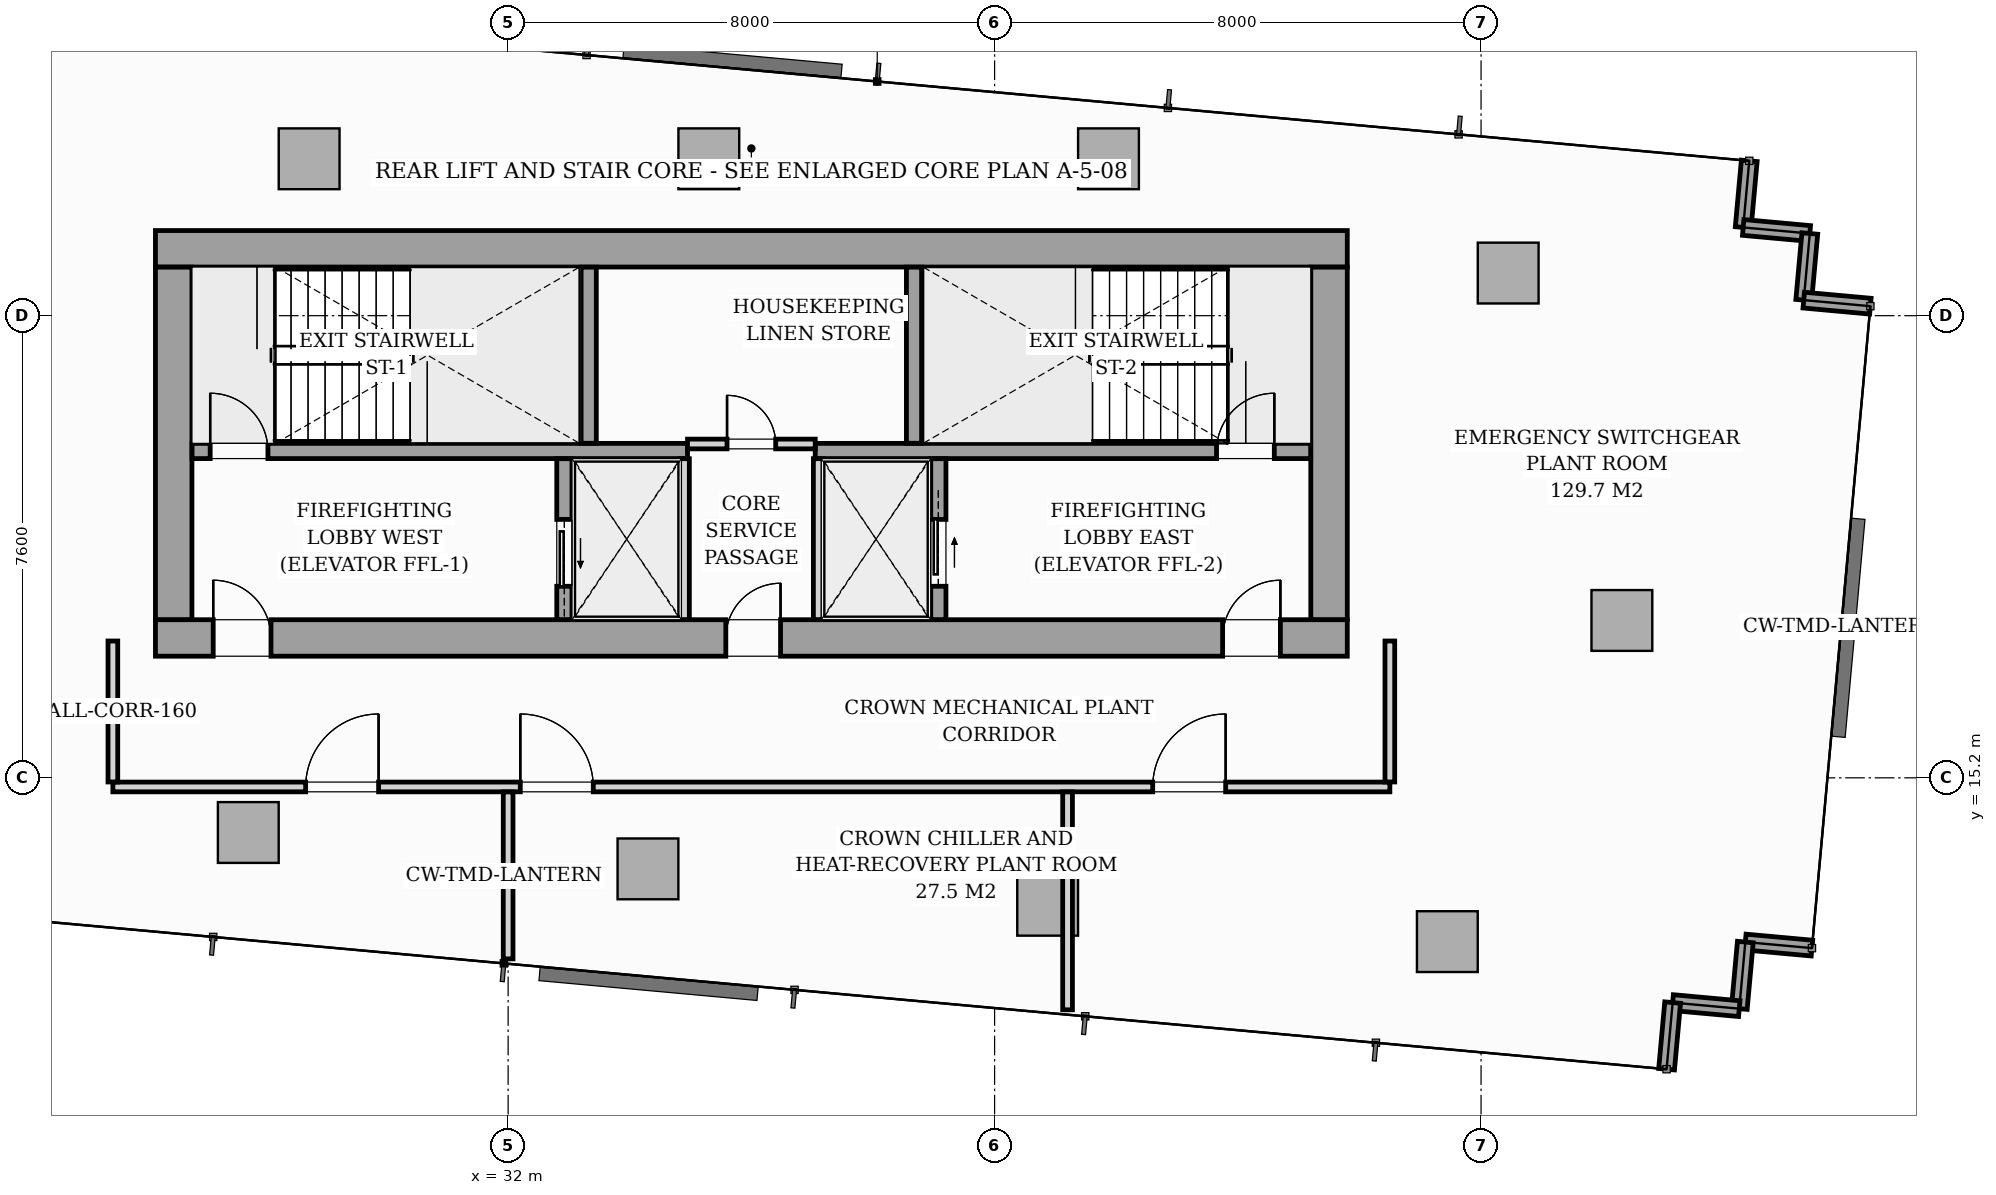
"""IFC4 building model, lengths in metres.
Left out: names, types, materials, properties, quantities, classifications, styles, units other than length and angle.
Written with IfcOpenShell. Run it as: python <this file> out.ifc"""

import sys

from ifc_helpers import new_model, si_unit, direction, frame, frame_2d, origin, origin_2d, place, context, subcontext, project, spatial, rectangle, i_section, extrude, source, transform, mapped, element, fill, save


model = new_model("IFC4")
c1 = context("Model", 3, precision=1e-05, world=origin(), true_north=direction((0.0, 1.0)))
c2 = subcontext(c1, "Body", "Model", "MODEL_VIEW")
j1 = project(units=[si_unit("LENGTHUNIT", "METRE"), si_unit("PLANEANGLEUNIT", "RADIAN")], contexts=[c1])
p1 = place(None, origin())
s1 = spatial("IfcSite", under=j1, at=p1, CompositionType="ELEMENT")
p2 = place(p1, origin())
s2 = spatial("IfcBuilding", under=s1, at=p2, CompositionType="ELEMENT")
p3 = place(p2, frame((0.0, 0.0, 277.3)))
s3 = spatial("IfcBuildingStorey", under=s2, at=p3, CompositionType="ELEMENT", Elevation=277.3)
m1 = source(origin(), c2, "Body", "SweptSolid", [
    extrude(i_section(OverallWidth=0.404, OverallDepth=0.407, WebThickness=0.027, FlangeThickness=0.044, FilletRadius=0.018, at=origin_2d()), origin(), (0.0, 0.0, 1.0), 6.496),
])
for number, where, z_axis, x_axis in (
    (1, (26.4, 17.4, 0.002), (0.0, 0.0, 1.0), (1.0, 0.0, 0.0)),
    (2, (33.12, 17.4, 0.002), (0.0, 0.0, 1.0), (1.0, 0.0, 0.0)),
    (3, (38.88, 17.4, 0.002), (0.0, 0.0, 1.0), (1.0, 0.0, 0.0)),
    (4, (45.6, 17.4, 0.002), (0.0, 0.0, 1.0), (1.0, 0.0, 0.0)),
    (5, (26.4, 24.0, 0.002), (0.0, 0.0, 1.0), (1.0, 0.0, 0.0)),
    (6, (33.12, 24.0, 0.002), (0.0, 0.0, 1.0), (1.0, 0.0, 0.0)),
    (7, (38.88, 24.0, 0.002), (0.0, 0.0, 1.0), (1.0, 0.0, 0.0)),
    (8, (45.6, 24.0, 0.002), (0.0, 0.0, 1.0), (1.0, 0.0, 0.0)),
):
    element("IfcColumn", number, at=place(p3, frame(where, z_axis=z_axis, x_axis=x_axis)), inside=s3, PredefinedType="PILASTER", context=c2, shape_type="MappedRepresentation", body=[
        mapped(m1, transform((0.0, 0.0, 0.0), scale=1.0)),
    ])
m2 = source(origin(), c2, "Body", "SweptSolid", [
    extrude(rectangle(XDim=1.0, YDim=1.0, at=origin_2d()), origin(), (0.0, 0.0, 1.0), 6.496),
])
for number, where, z_axis, x_axis in (
    (9, (27.727, 14.301, 0.002), (0.0, 0.0, 1.0), (0.996, -0.091, 0.0)),
    (10, (34.3, 13.703, 0.002), (0.0, 0.0, 1.0), (0.996, -0.091, 0.0)),
    (11, (40.873, 13.104, 0.002), (0.0, 0.0, 1.0), (0.996, -0.091, 0.0)),
    (12, (47.445, 12.506, 0.002), (0.0, 0.0, 1.0), (0.996, -0.091, 0.0)),
    (13, (28.728, 25.38, 0.002), (0.0, 0.0, 1.0), (0.996, -0.091, 0.0)),
    (14, (35.3, 25.38, 0.002), (0.0, 0.0, 1.0), (0.996, -0.091, 0.0)),
    (15, (41.873, 25.38, 0.002), (0.0, 0.0, 1.0), (0.996, -0.091, 0.0)),
    (16, (48.446, 23.501, 0.002), (0.0, 0.0, 1.0), (0.996, -0.091, 0.0)),
    (17, (50.316, 17.788, 0.002), (0.0, 0.0, 1.0), (0.996, -0.091, 0.0)),
):
    element("IfcColumn", number, at=place(p3, frame(where, z_axis=z_axis, x_axis=x_axis)), inside=s3, PredefinedType="COLUMN", context=c2, shape_type="MappedRepresentation", body=[
        mapped(m2, transform((0.0, 0.0, 0.0), scale=1.0)),
    ])
p4 = place(p3, frame((52.411, 25.346, 0.0), z_axis=(0.0, 0.0, 1.0), x_axis=(-0.09077588162, -0.995871346769, 0.0)))
e18 = element("IfcWall", 18, at=p4, inside=s3, PredefinedType="STANDARD", context=c2, shape_type="SweptSolid", body=[
    extrude(rectangle(XDim=1.1, YDim=0.26, at=frame_2d((0.55, 0.0))), origin(), (0.0, 0.0, 1.0), 6.22),
])
p5 = place(p3, frame((52.311, 24.251, 0.0), z_axis=(0.0, 0.0, 1.0), x_axis=(0.995893206468, -0.090535746043, 0.0)))
e19 = element("IfcWall", 19, at=p5, inside=s3, PredefinedType="STANDARD", context=c2, shape_type="SweptSolid", body=[
    extrude(rectangle(XDim=1.1, YDim=0.26, at=frame_2d((0.55, 0.0))), origin(), (0.0, 0.0, 1.0), 6.22),
])
for number, where, z_axis, x_axis in (
    (20, (53.406, 24.151, 0.0), (0.0, 0.0, 1.0), (-0.091, -0.996, 0.0)),
    (21, (53.307, 23.056, 0.0), (0.0, 0.0, 1.0), (0.996, -0.091, 0.0)),
    (22, (53.441, 12.4, 0.0), (0.0, 0.0, 1.0), (-0.996, 0.091, 0.0)),
    (23, (52.346, 12.5, 0.0), (0.0, 0.0, 1.0), (-0.091, -0.996, 0.0)),
    (24, (52.246, 11.404, 0.0), (0.0, 0.0, 1.0), (-0.996, 0.091, 0.0)),
    (25, (51.151, 11.504, 0.0), (0.0, 0.0, 1.0), (-0.091, -0.996, 0.0)),
):
    element("IfcWall", number, at=place(p3, frame(where, z_axis=z_axis, x_axis=x_axis)), inside=s3, PredefinedType="STANDARD", context=c2, shape_type="SweptSolid", body=[
        extrude(rectangle(XDim=1.1, YDim=0.26, at=frame_2d((0.55, 0.0))), origin(), (0.0, 0.0, 1.0), 6.22),
    ])
p6 = place(p3, frame((26.2, 17.5, 0.0), z_axis=(0.0, 0.0, 1.0), x_axis=(1.0, 0.0, 0.0)))
e26 = element("IfcWall", 26, at=p6, inside=s3, PredefinedType="SHEAR", context=c2, shape_type="SweptSolid", body=[
    extrude(rectangle(XDim=19.6, YDim=0.6, at=frame_2d((9.8, 0.0))), origin(), (0.0, 0.0, 1.0), 6.5),
])
p7 = place(p6, frame((0.95, 0.0, 0.0)))
e27 = element("IfcOpeningElement", 27, at=p7, cuts=e26, PredefinedType="OPENING", context=c2, shape_type="SweptSolid", body=[
    extrude(rectangle(XDim=0.95, YDim=2.06, at=frame_2d((0.475, 1.03))), frame((0.0, 0.31, 0.0), z_axis=(0.0, -1.0, 0.0), x_axis=(1.0, 0.0, 0.0)), (0.0, 0.0, 1.0), 0.62),
])
p8 = place(p6, frame((9.38, 0.0, 0.0)))
e28 = element("IfcOpeningElement", 28, at=p8, cuts=e26, PredefinedType="OPENING", context=c2, shape_type="SweptSolid", body=[
    extrude(rectangle(XDim=0.9, YDim=2.06, at=frame_2d((0.45, 1.03))), frame((0.0, 0.31, 0.0), z_axis=(0.0, -1.0, 0.0), x_axis=(1.0, 0.0, 0.0)), (0.0, 0.0, 1.0), 0.62),
])
p9 = place(p6, frame((17.55, 0.0, 0.0)))
e29 = element("IfcOpeningElement", 29, at=p9, cuts=e26, PredefinedType="OPENING", context=c2, shape_type="SweptSolid", body=[
    extrude(rectangle(XDim=0.95, YDim=2.06, at=frame_2d((0.475, 1.03))), frame((0.0, 0.31, 0.0), z_axis=(0.0, -1.0, 0.0), x_axis=(1.0, 0.0, 0.0)), (0.0, 0.0, 1.0), 0.62),
])
p10 = place(p3, frame((26.2, 23.9, 0.0), z_axis=(0.0, 0.0, 1.0), x_axis=(1.0, 0.0, 0.0)))
e30 = element("IfcWall", 30, at=p10, inside=s3, PredefinedType="SHEAR", context=c2, shape_type="SweptSolid", body=[
    extrude(rectangle(XDim=19.6, YDim=0.6, at=frame_2d((9.8, 0.0))), origin(), (0.0, 0.0, 1.0), 6.5),
])
for number, where, z_axis, x_axis in (
    (31, (26.5, 17.802, 0.0), (0.0, 0.0, 1.0), (0.0, 1.0, 0.0)),
    (32, (45.5, 17.802, 0.0), (0.0, 0.0, 1.0), (0.0, 1.0, 0.0)),
):
    element("IfcWall", number, at=place(p3, frame(where, z_axis=z_axis, x_axis=x_axis)), inside=s3, PredefinedType="SHEAR", context=c2, shape_type="SweptSolid", body=[
        extrude(rectangle(XDim=5.796, YDim=0.6, at=frame_2d((2.898, 0.0))), origin(), (0.0, 0.0, 1.0), 6.5),
    ])
p11 = place(p3, frame((26.802, 20.575, 0.0), z_axis=(0.0, 0.0, 1.0), x_axis=(1.0, 0.0, 0.0)))
e33 = element("IfcWall", 33, at=p11, inside=s3, PredefinedType="SOLIDWALL", context=c2, shape_type="SweptSolid", body=[
    extrude(rectangle(XDim=8.148, YDim=0.25, at=frame_2d((4.074, 0.0))), origin(), (0.0, 0.0, 1.0), 6.5),
])
p12 = place(p11, frame((0.298, 0.0, 0.0)))
e34 = element("IfcOpeningElement", 34, at=p12, cuts=e33, PredefinedType="OPENING", context=c2, shape_type="SweptSolid", body=[
    extrude(rectangle(XDim=0.95, YDim=2.06, at=frame_2d((0.475, 1.03))), frame((0.0, 0.135, 0.0), z_axis=(0.0, -1.0, 0.0), x_axis=(1.0, 0.0, 0.0)), (0.0, 0.0, 1.0), 0.27),
])
p13 = place(p3, frame((37.05, 20.575, 0.0), z_axis=(0.0, 0.0, 1.0), x_axis=(1.0, 0.0, 0.0)))
e35 = element("IfcWall", 35, at=p13, inside=s3, PredefinedType="SOLIDWALL", context=c2, shape_type="SweptSolid", body=[
    extrude(rectangle(XDim=8.148, YDim=0.25, at=frame_2d((4.074, 0.0))), origin(), (0.0, 0.0, 1.0), 6.5),
])
p14 = place(p13, frame((6.6, 0.0, 0.0)))
e36 = element("IfcOpeningElement", 36, at=p14, cuts=e35, PredefinedType="OPENING", context=c2, shape_type="SweptSolid", body=[
    extrude(rectangle(XDim=0.95, YDim=2.06, at=frame_2d((0.475, 1.03))), frame((0.0, 0.135, 0.0), z_axis=(0.0, -1.0, 0.0), x_axis=(1.0, 0.0, 0.0)), (0.0, 0.0, 1.0), 0.27),
])
for number, where, z_axis, x_axis in (
    (37, (33.325, 20.702, 0.0), (0.0, 0.0, 1.0), (0.0, 1.0, 0.0)),
    (38, (38.675, 20.702, 0.0), (0.0, 0.0, 1.0), (0.0, 1.0, 0.0)),
):
    element("IfcWall", number, at=place(p3, frame(where, z_axis=z_axis, x_axis=x_axis)), inside=s3, PredefinedType="SOLIDWALL", context=c2, shape_type="SweptSolid", body=[
        extrude(rectangle(XDim=2.896, YDim=0.25, at=frame_2d((1.448, 0.0))), origin(), (0.0, 0.0, 1.0), 6.5),
    ])
p15 = place(p3, frame((32.925, 17.802, 0.0), z_axis=(0.0, 0.0, 1.0), x_axis=(0.0, 1.0, 0.0)))
e39 = element("IfcWall", 39, at=p15, inside=s3, PredefinedType="SOLIDWALL", context=c2, shape_type="SweptSolid", body=[
    extrude(rectangle(XDim=2.646, YDim=0.25, at=frame_2d((1.323, 0.0))), origin(), (0.0, 0.0, 1.0), 6.5),
])
p16 = place(p15, frame((0.548, 0.0, 0.0)))
e40 = element("IfcOpeningElement", 40, at=p16, cuts=e39, PredefinedType="OPENING", context=c2, shape_type="SweptSolid", body=[
    extrude(rectangle(XDim=1.1, YDim=2.08, at=frame_2d((0.55, 1.04))), frame((0.0, 0.135, 0.0), z_axis=(0.0, -1.0, 0.0), x_axis=(1.0, 0.0, 0.0)), (0.0, 0.0, 1.0), 0.27),
])
for number, where, z_axis, x_axis in (
    (41, (34.9, 17.802, 0.0), (0.0, 0.0, 1.0), (0.0, 1.0, 0.0)),
    (42, (37.1, 17.802, 0.0), (0.0, 0.0, 1.0), (0.0, 1.0, 0.0)),
):
    element("IfcWall", number, at=place(p3, frame(where, z_axis=z_axis, x_axis=x_axis)), inside=s3, PredefinedType="PARTITIONING", context=c2, shape_type="SweptSolid", body=[
        extrude(rectangle(XDim=2.646, YDim=0.16, at=frame_2d((1.323, 0.0))), origin(), (0.0, 0.0, 1.0), 6.22),
    ])
p17 = place(p3, frame((39.075, 17.802, 0.0), z_axis=(0.0, 0.0, 1.0), x_axis=(0.0, 1.0, 0.0)))
e43 = element("IfcWall", 43, at=p17, inside=s3, PredefinedType="SOLIDWALL", context=c2, shape_type="SweptSolid", body=[
    extrude(rectangle(XDim=2.646, YDim=0.25, at=frame_2d((1.323, 0.0))), origin(), (0.0, 0.0, 1.0), 6.5),
])
p18 = place(p17, frame((0.548, 0.0, 0.0)))
e44 = element("IfcOpeningElement", 44, at=p18, cuts=e43, PredefinedType="OPENING", context=c2, shape_type="SweptSolid", body=[
    extrude(rectangle(XDim=1.1, YDim=2.08, at=frame_2d((0.55, 1.04))), frame((0.0, 0.135, 0.0), z_axis=(0.0, -1.0, 0.0), x_axis=(1.0, 0.0, 0.0)), (0.0, 0.0, 1.0), 0.27),
])
p19 = place(p3, frame((34.95, 20.69, 0.0), z_axis=(0.0, 0.0, 1.0), x_axis=(1.0, 0.0, 0.0)))
e45 = element("IfcWall", 45, at=p19, inside=s3, PredefinedType="PARTITIONING", context=c2, shape_type="SweptSolid", body=[
    extrude(rectangle(XDim=2.1, YDim=0.16, at=frame_2d((1.05, 0.0))), origin(), (0.0, 0.0, 1.0), 6.22),
])
p20 = place(p19, frame((0.65, 0.0, 0.0)))
e46 = element("IfcOpeningElement", 46, at=p20, cuts=e45, PredefinedType="OPENING", context=c2, shape_type="SweptSolid", body=[
    extrude(rectangle(XDim=0.8, YDim=2.05, at=frame_2d((0.4, 1.025))), frame((0.0, 0.09, 0.0), z_axis=(0.0, -1.0, 0.0), x_axis=(1.0, 0.0, 0.0)), (0.0, 0.0, 1.0), 0.18),
])
p21 = place(p3, frame((25.5, 15.05, 0.0), z_axis=(0.0, 0.0, 1.0), x_axis=(1.0, 0.0, 0.0)))
e47 = element("IfcWall", 47, at=p21, inside=s3, PredefinedType="PARTITIONING", context=c2, shape_type="SweptSolid", body=[
    extrude(rectangle(XDim=21.0, YDim=0.16, at=frame_2d((10.5, 0.0))), origin(), (0.0, 0.0, 1.0), 5.948),
])
p22 = place(p21, frame((3.17, 0.0, 0.0)))
e48 = element("IfcOpeningElement", 48, at=p22, cuts=e47, PredefinedType="OPENING", context=c2, shape_type="SweptSolid", body=[
    extrude(rectangle(XDim=1.2, YDim=2.08, at=frame_2d((0.6, 1.04))), frame((0.0, 0.09, 0.0), z_axis=(0.0, -1.0, 0.0), x_axis=(1.0, 0.0, 0.0)), (0.0, 0.0, 1.0), 0.18),
])
p23 = place(p21, frame((6.7, 0.0, 0.0)))
e49 = element("IfcOpeningElement", 49, at=p23, cuts=e47, PredefinedType="OPENING", context=c2, shape_type="SweptSolid", body=[
    extrude(rectangle(XDim=1.2, YDim=2.08, at=frame_2d((0.6, 1.04))), frame((0.0, 0.09, 0.0), z_axis=(0.0, -1.0, 0.0), x_axis=(1.0, 0.0, 0.0)), (0.0, 0.0, 1.0), 0.18),
])
p24 = place(p21, frame((17.1, 0.0, 0.0)))
e50 = element("IfcOpeningElement", 50, at=p24, cuts=e47, PredefinedType="OPENING", context=c2, shape_type="SweptSolid", body=[
    extrude(rectangle(XDim=1.2, YDim=2.08, at=frame_2d((0.6, 1.04))), frame((0.0, 0.09, 0.0), z_axis=(0.0, -1.0, 0.0), x_axis=(1.0, 0.0, 0.0)), (0.0, 0.0, 1.0), 0.18),
])
for number, where, z_axis, x_axis in (
    (51, (25.5, 15.132, 0.0), (0.0, 0.0, 1.0), (0.0, 1.0, 0.0)),
    (52, (46.5, 15.132, 0.0), (0.0, 0.0, 1.0), (0.0, 1.0, 0.0)),
):
    element("IfcWall", number, at=place(p3, frame(where, z_axis=z_axis, x_axis=x_axis)), inside=s3, PredefinedType="PARTITIONING", context=c2, shape_type="SweptSolid", body=[
        extrude(rectangle(XDim=2.318, YDim=0.16, at=frame_2d((1.159, 0.0))), origin(), (0.0, 0.0, 1.0), 6.22),
    ])
p25 = place(p3, frame((32.0, 12.222, 0.0), z_axis=(0.0, 0.0, 1.0), x_axis=(0.0, 1.0, 0.0)))
e53 = element("IfcWall", 53, at=p25, inside=s3, PredefinedType="PARTITIONING", context=c2, shape_type="SweptSolid", body=[
    extrude(rectangle(XDim=2.746, YDim=0.16, at=frame_2d((1.373, 0.0))), origin(), (0.0, 0.0, 1.0), 6.22),
])
p26 = place(p3, frame((41.2, 11.385, 0.0), z_axis=(0.0, 0.0, 1.0), x_axis=(0.0, 1.0, 0.0)))
e54 = element("IfcWall", 54, at=p26, inside=s3, PredefinedType="PARTITIONING", context=c2, shape_type="SweptSolid", body=[
    extrude(rectangle(XDim=3.583, YDim=0.16, at=frame_2d((1.792, 0.0))), origin(), (0.0, 0.0, 1.0), 6.22),
])
m3 = source(origin(), c2, "Body", "SweptSolid", [
    extrude(rectangle(XDim=0.95, YDim=2.06, at=frame_2d((0.475, 1.03))), frame((0.0, 0.025, 0.0), z_axis=(0.0, -1.0, 0.0), x_axis=(1.0, 0.0, 0.0)), (0.0, 0.0, 1.0), 0.05),
])
p27 = place(p7, origin())
e55 = element("IfcDoor", 55, at=p27, inside=s3, OperationType="SINGLE_SWING_LEFT", PredefinedType="DOOR", context=c2, shape_type="MappedRepresentation", body=[
    mapped(m3, transform((0.0, 0.0, 0.0), scale=1.0)),
])
fill(e27, e55)
m4 = source(origin(), c2, "Body", "SweptSolid", [
    extrude(rectangle(XDim=0.9, YDim=2.06, at=frame_2d((0.45, 1.03))), frame((0.0, 0.025, 0.0), z_axis=(0.0, -1.0, 0.0), x_axis=(1.0, 0.0, 0.0)), (0.0, 0.0, 1.0), 0.05),
])
p28 = place(p8, origin())
e56 = element("IfcDoor", 56, at=p28, inside=s3, OperationType="SINGLE_SWING_RIGHT", PredefinedType="DOOR", context=c2, shape_type="MappedRepresentation", body=[
    mapped(m4, transform((0.0, 0.0, 0.0), scale=1.0)),
])
fill(e28, e56)
p29 = place(p9, origin())
e57 = element("IfcDoor", 57, at=p29, inside=s3, OperationType="SINGLE_SWING_RIGHT", PredefinedType="DOOR", context=c2, shape_type="MappedRepresentation", body=[
    mapped(m3, transform((0.0, 0.0, 0.0), scale=1.0)),
])
fill(e29, e57)
p30 = place(p12, origin())
e58 = element("IfcDoor", 58, at=p30, inside=s3, OperationType="SINGLE_SWING_LEFT", PredefinedType="DOOR", context=c2, shape_type="MappedRepresentation", body=[
    mapped(m3, transform((0.0, 0.0, 0.0), scale=1.0)),
])
fill(e34, e58)
p31 = place(p14, origin())
e59 = element("IfcDoor", 59, at=p31, inside=s3, OperationType="SINGLE_SWING_RIGHT", PredefinedType="DOOR", context=c2, shape_type="MappedRepresentation", body=[
    mapped(m3, transform((0.0, 0.0, 0.0), scale=1.0)),
])
fill(e36, e59)
m5 = source(origin(), c2, "Body", "SweptSolid", [
    extrude(rectangle(XDim=1.1, YDim=2.08, at=frame_2d((0.55, 1.04))), frame((0.0, 0.025, 0.0), z_axis=(0.0, -1.0, 0.0), x_axis=(1.0, 0.0, 0.0)), (0.0, 0.0, 1.0), 0.05),
])
p32 = place(p16, origin())
e60 = element("IfcDoor", 60, at=p32, inside=s3, OperationType="SLIDING_TO_LEFT", PredefinedType="DOOR", context=c2, shape_type="MappedRepresentation", body=[
    mapped(m5, transform((0.0, 0.0, 0.0), scale=1.0)),
])
fill(e40, e60)
p33 = place(p18, origin())
e61 = element("IfcDoor", 61, at=p33, inside=s3, OperationType="SLIDING_TO_RIGHT", PredefinedType="DOOR", context=c2, shape_type="MappedRepresentation", body=[
    mapped(m5, transform((0.0, 0.0, 0.0), scale=1.0)),
])
fill(e44, e61)
m6 = source(origin(), c2, "Body", "SweptSolid", [
    extrude(rectangle(XDim=0.8, YDim=2.05, at=frame_2d((0.4, 1.025))), frame((0.0, 0.025, 0.0), z_axis=(0.0, -1.0, 0.0), x_axis=(1.0, 0.0, 0.0)), (0.0, 0.0, 1.0), 0.05),
])
p34 = place(p20, origin())
e62 = element("IfcDoor", 62, at=p34, inside=s3, OperationType="SINGLE_SWING_LEFT", PredefinedType="DOOR", context=c2, shape_type="MappedRepresentation", body=[
    mapped(m6, transform((0.0, 0.0, 0.0), scale=1.0)),
])
fill(e46, e62)
m7 = source(origin(), c2, "Body", "SweptSolid", [
    extrude(rectangle(XDim=1.2, YDim=2.08, at=frame_2d((0.6, 1.04))), frame((0.0, 0.025, 0.0), z_axis=(0.0, -1.0, 0.0), x_axis=(1.0, 0.0, 0.0)), (0.0, 0.0, 1.0), 0.05),
])
p35 = place(p22, origin())
e63 = element("IfcDoor", 63, at=p35, inside=s3, OperationType="SINGLE_SWING_RIGHT", PredefinedType="DOOR", context=c2, shape_type="MappedRepresentation", body=[
    mapped(m7, transform((0.0, 0.0, 0.0), scale=1.0)),
])
fill(e48, e63)
p36 = place(p23, origin())
e64 = element("IfcDoor", 64, at=p36, inside=s3, OperationType="SINGLE_SWING_LEFT", PredefinedType="DOOR", context=c2, shape_type="MappedRepresentation", body=[
    mapped(m7, transform((0.0, 0.0, 0.0), scale=1.0)),
])
fill(e49, e64)
p37 = place(p24, origin())
e65 = element("IfcDoor", 65, at=p37, inside=s3, OperationType="SINGLE_SWING_RIGHT", PredefinedType="DOOR", context=c2, shape_type="MappedRepresentation", body=[
    mapped(m7, transform((0.0, 0.0, 0.0), scale=1.0)),
])
fill(e50, e65)
save(model, sys.argv[1])
